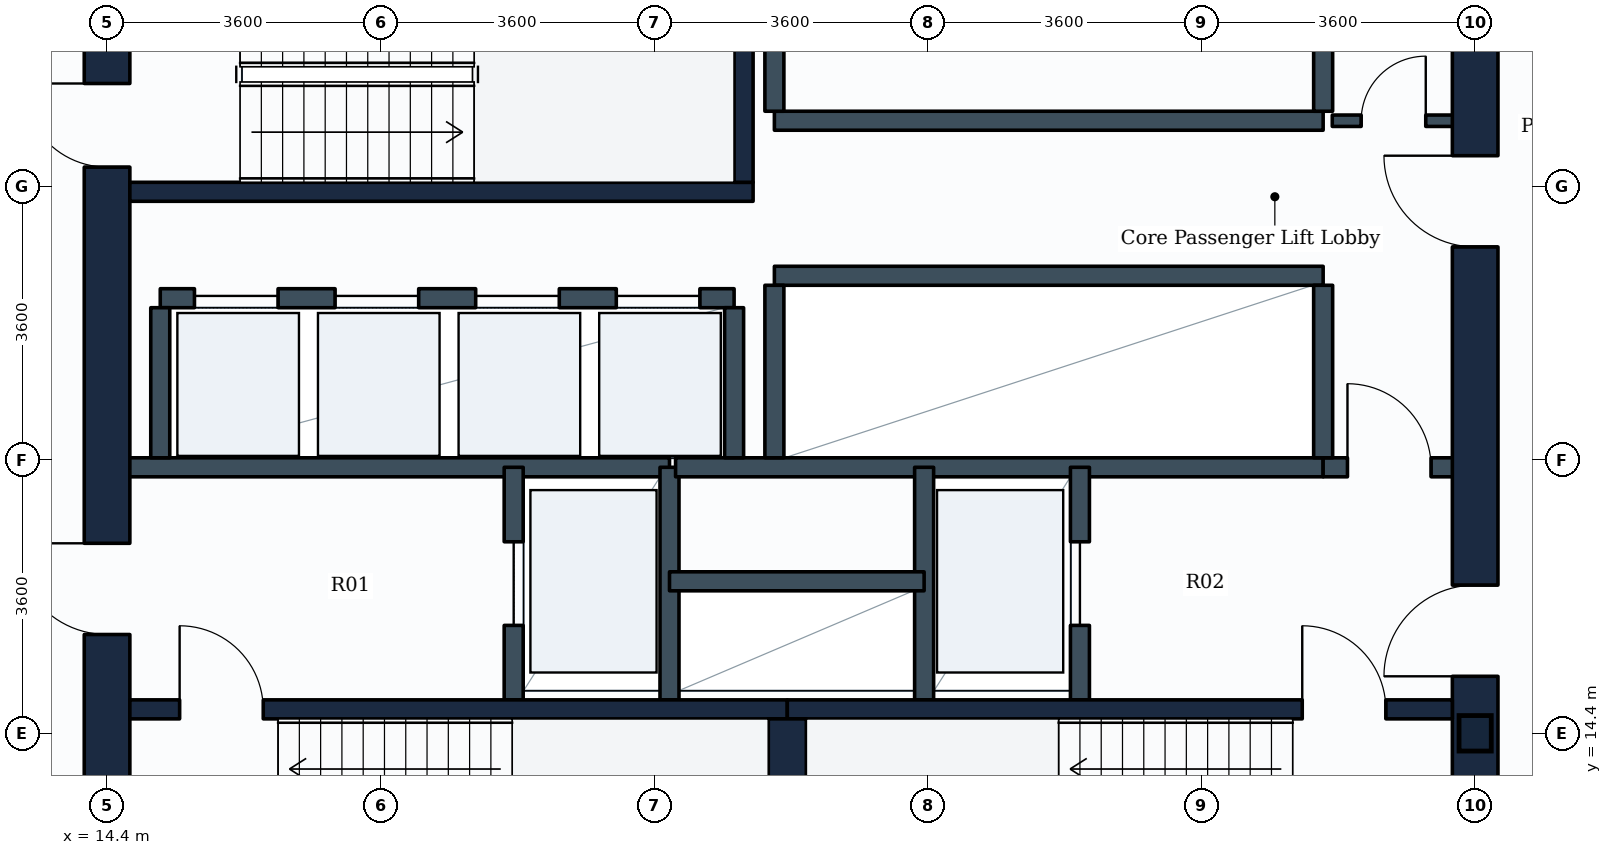
"""IFC4 building model, lengths in metres.
Left out: names, types, materials, properties, quantities, classifications, styles, units other than length and angle.
Written with IfcOpenShell. Run it as: python <this file> out.ifc"""

import sys

from ifc_helpers import new_model, si_unit, direction, frame, frame_2d, origin, origin_2d, place, context, subcontext, project, spatial, rectangle, i_section, extrude, element, fill, save


model = new_model("IFC4")
c1 = context("Model", 3, precision=1e-05, world=origin(), true_north=direction((0.0, 1.0)))
c2 = subcontext(c1, "Body", "Model", "MODEL_VIEW")
j1 = project(units=[si_unit("LENGTHUNIT", "METRE"), si_unit("PLANEANGLEUNIT", "RADIAN")], contexts=[c1])
p1 = place(None, origin())
s1 = spatial("IfcSite", under=j1, at=p1, CompositionType="ELEMENT")
p2 = place(p1, origin())
s2 = spatial("IfcBuilding", under=s1, at=p2, CompositionType="ELEMENT")
p3 = place(p2, frame((0.0, 0.0, 103.5)))
s3 = spatial("IfcBuildingStorey", under=s2, at=p3, CompositionType="ELEMENT", Elevation=103.5)
p4 = place(p3, frame((32.4, 14.4, 0.0), z_axis=(0.0, 0.0, 1.0), x_axis=(1.0, 0.0, 0.0)))
e1 = element("IfcColumn", 1, at=p4, inside=s3, PredefinedType="COLUMN", context=c2, shape_type="SweptSolid", body=[
    extrude(i_section(OverallWidth=0.424, OverallDepth=0.467, WebThickness=0.033, FlangeThickness=0.053, FilletRadius=0.015, at=origin_2d()), origin(), (0.0, 0.0, 1.0), 3.9),
])
p5 = place(p3, frame((14.4, 10.8, 0.0), z_axis=(0.0, 0.0, 1.0), x_axis=(0.0, 1.0, 0.0)))
e2 = element("IfcWall", 2, at=p5, inside=s3, PredefinedType="SHEAR", context=c2, shape_type="SweptSolid", body=[
    extrude(rectangle(XDim=14.4, YDim=0.6, at=frame_2d((7.2, 0.0))), origin(), (0.0, 0.0, 1.0), 3.65),
])
p6 = place(p5, frame((11.05, 0.0, 0.0)))
e3 = element("IfcOpeningElement", 3, at=p6, cuts=e2, PredefinedType="OPENING", context=c2, shape_type="SweptSolid", body=[
    extrude(rectangle(XDim=1.1, YDim=2.1, at=frame_2d((0.55, 1.05))), frame((0.0, 0.31, 0.0), z_axis=(0.0, -1.0, 0.0), x_axis=(1.0, 0.0, 0.0)), (0.0, 0.0, 1.0), 0.62),
])
p7 = place(p5, frame((4.9, 0.0, 0.0)))
e4 = element("IfcOpeningElement", 4, at=p7, cuts=e2, PredefinedType="OPENING", context=c2, shape_type="SweptSolid", body=[
    extrude(rectangle(XDim=1.2, YDim=2.1, at=frame_2d((0.6, 1.05))), frame((0.0, 0.31, 0.0), z_axis=(0.0, -1.0, 0.0), x_axis=(1.0, 0.0, 0.0)), (0.0, 0.0, 1.0), 0.62),
])
p8 = place(p3, frame((32.4, 10.8, 0.0), z_axis=(0.0, 0.0, 1.0), x_axis=(0.0, 1.0, 0.0)))
e5 = element("IfcWall", 5, at=p8, inside=s3, PredefinedType="SHEAR", context=c2, shape_type="SweptSolid", body=[
    extrude(rectangle(XDim=14.4, YDim=0.6, at=frame_2d((7.2, 0.0))), origin(), (0.0, 0.0, 1.0), 3.65),
])
p9 = place(p8, frame((4.35, 0.0, 0.0)))
e6 = element("IfcOpeningElement", 6, at=p9, cuts=e5, PredefinedType="OPENING", context=c2, shape_type="SweptSolid", body=[
    extrude(rectangle(XDim=1.2, YDim=2.1, at=frame_2d((0.6, 1.05))), frame((0.0, 0.31, 0.0), z_axis=(0.0, -1.0, 0.0), x_axis=(1.0, 0.0, 0.0)), (0.0, 0.0, 1.0), 0.62),
])
p10 = place(p8, frame((10.0, 0.0, 0.0)))
e7 = element("IfcOpeningElement", 7, at=p10, cuts=e5, PredefinedType="OPENING", context=c2, shape_type="SweptSolid", body=[
    extrude(rectangle(XDim=1.2, YDim=2.1, at=frame_2d((0.6, 1.05))), frame((0.0, 0.31, 0.0), z_axis=(0.0, -1.0, 0.0), x_axis=(1.0, 0.0, 0.0)), (0.0, 0.0, 1.0), 0.62),
])
p11 = place(p3, frame((14.7, 14.715, 0.0), z_axis=(0.0, 0.0, 1.0), x_axis=(1.0, 0.0, 0.0)))
e8 = element("IfcWall", 8, at=p11, inside=s3, PredefinedType="SHEAR", context=c2, shape_type="SweptSolid", body=[
    extrude(rectangle(XDim=8.65, YDim=0.25, at=frame_2d((4.325, 0.0))), origin(), (0.0, 0.0, 1.0), 3.65),
])
p12 = place(p11, frame((0.655, 0.0, 0.0)))
e9 = element("IfcOpeningElement", 9, at=p12, cuts=e8, PredefinedType="OPENING", context=c2, shape_type="SweptSolid", body=[
    extrude(rectangle(XDim=1.1, YDim=2.1, at=frame_2d((0.55, 1.05))), frame((0.0, 0.135, 0.0), z_axis=(0.0, -1.0, 0.0), x_axis=(1.0, 0.0, 0.0)), (0.0, 0.0, 1.0), 0.27),
])
p13 = place(p3, frame((23.35, 14.715, 0.0), z_axis=(0.0, 0.0, 1.0), x_axis=(1.0, 0.0, 0.0)))
e10 = element("IfcWall", 10, at=p13, inside=s3, PredefinedType="SHEAR", context=c2, shape_type="SweptSolid", body=[
    extrude(rectangle(XDim=8.75, YDim=0.25, at=frame_2d((4.375, 0.0))), origin(), (0.0, 0.0, 1.0), 3.65),
])
p14 = place(p13, frame((6.775, 0.0, 0.0)))
e11 = element("IfcOpeningElement", 11, at=p14, cuts=e10, PredefinedType="OPENING", context=c2, shape_type="SweptSolid", body=[
    extrude(rectangle(XDim=1.1, YDim=2.1, at=frame_2d((0.55, 1.05))), frame((0.0, 0.135, 0.0), z_axis=(0.0, -1.0, 0.0), x_axis=(1.0, 0.0, 0.0)), (0.0, 0.0, 1.0), 0.27),
])
p15 = place(p3, frame((23.35, 11.75, 0.0), z_axis=(0.0, 0.0, 1.0), x_axis=(0.0, 1.0, 0.0)))
e12 = element("IfcWall", 12, at=p15, inside=s3, PredefinedType="SHEAR", context=c2, shape_type="SweptSolid", body=[
    extrude(rectangle(XDim=2.84, YDim=0.5, at=frame_2d((1.42, 0.0))), origin(), (0.0, 0.0, 1.0), 3.65),
])
p16 = place(p3, frame((14.7, 21.525, 0.0), z_axis=(0.0, 0.0, 1.0), x_axis=(1.0, 0.0, 0.0)))
e13 = element("IfcWall", 13, at=p16, inside=s3, PredefinedType="SHEAR", context=c2, shape_type="SweptSolid", body=[
    extrude(rectangle(XDim=8.2, YDim=0.25, at=frame_2d((4.1, 0.0))), origin(), (0.0, 0.0, 1.0), 3.65),
])
p17 = place(p3, frame((22.775, 21.65, 0.0), z_axis=(0.0, 0.0, 1.0), x_axis=(0.0, 1.0, 0.0)))
e14 = element("IfcWall", 14, at=p17, inside=s3, PredefinedType="SHEAR", context=c2, shape_type="SweptSolid", body=[
    extrude(rectangle(XDim=2.84, YDim=0.25, at=frame_2d((1.42, 0.0))), origin(), (0.0, 0.0, 1.0), 3.65),
])
p18 = place(p3, frame((14.65, 17.9, 0.0), z_axis=(0.0, 0.0, 1.0), x_axis=(1.0, 0.0, 0.0)))
e15 = element("IfcWall", 15, at=p18, inside=s3, PredefinedType="PARTITIONING", context=c2, shape_type="SweptSolid", body=[
    extrude(rectangle(XDim=7.15, YDim=0.25, at=frame_2d((3.575, 0.0))), origin(), (0.0, 0.0, 1.0), 3.635),
])
p19 = place(p3, frame((19.75, 14.84, 0.0), z_axis=(0.0, 0.0, 1.0), x_axis=(0.0, 1.0, 0.0)))
e16 = element("IfcWall", 16, at=p19, inside=s3, PredefinedType="PARTITIONING", context=c2, shape_type="SweptSolid", body=[
    extrude(rectangle(XDim=3.06, YDim=0.25, at=frame_2d((1.53, 0.0))), origin(), (0.0, 0.0, 1.0), 3.635),
])
p20 = place(p19, frame((0.98, 0.0, 0.0)))
e17 = element("IfcOpeningElement", 17, at=p20, cuts=e16, PredefinedType="OPENING", context=c2, shape_type="SweptSolid", body=[
    extrude(rectangle(XDim=1.1, YDim=2.1, at=frame_2d((0.55, 1.05))), frame((0.0, 0.135, 0.0), z_axis=(0.0, -1.0, 0.0), x_axis=(1.0, 0.0, 0.0)), (0.0, 0.0, 1.0), 0.27),
])
p21 = place(p3, frame((21.8, 14.84, 0.0), z_axis=(0.0, 0.0, 1.0), x_axis=(0.0, 1.0, 0.0)))
e18 = element("IfcWall", 18, at=p21, inside=s3, PredefinedType="PARTITIONING", context=c2, shape_type="SweptSolid", body=[
    extrude(rectangle(XDim=3.06, YDim=0.25, at=frame_2d((1.53, 0.0))), origin(), (0.0, 0.0, 1.0), 3.635),
])
p22 = place(p3, frame((21.88, 17.9, 0.0), z_axis=(0.0, 0.0, 1.0), x_axis=(1.0, 0.0, 0.0)))
e19 = element("IfcWall", 19, at=p22, inside=s3, PredefinedType="PARTITIONING", context=c2, shape_type="SweptSolid", body=[
    extrude(rectangle(XDim=8.52, YDim=0.25, at=frame_2d((4.26, 0.0))), origin(), (0.0, 0.0, 1.0), 3.635),
])
p23 = place(p3, frame((30.4, 17.9, 0.0), z_axis=(0.0, 0.0, 1.0), x_axis=(1.0, 0.0, 0.0)))
e20 = element("IfcWall", 20, at=p23, inside=s3, PredefinedType="PARTITIONING", context=c2, shape_type="SweptSolid", body=[
    extrude(rectangle(XDim=1.75, YDim=0.25, at=frame_2d((0.875, 0.0))), origin(), (0.0, 0.0, 1.0), 3.635),
])
p24 = place(p23, frame((0.32, 0.0, 0.0)))
e21 = element("IfcOpeningElement", 21, at=p24, cuts=e20, PredefinedType="OPENING", context=c2, shape_type="SweptSolid", body=[
    extrude(rectangle(XDim=1.1, YDim=2.1, at=frame_2d((0.55, 1.05))), frame((0.0, 0.135, 0.0), z_axis=(0.0, -1.0, 0.0), x_axis=(1.0, 0.0, 0.0)), (0.0, 0.0, 1.0), 0.27),
])
p25 = place(p3, frame((25.15, 14.84, 0.0), z_axis=(0.0, 0.0, 1.0), x_axis=(0.0, 1.0, 0.0)))
e22 = element("IfcWall", 22, at=p25, inside=s3, PredefinedType="PARTITIONING", context=c2, shape_type="SweptSolid", body=[
    extrude(rectangle(XDim=3.06, YDim=0.25, at=frame_2d((1.53, 0.0))), origin(), (0.0, 0.0, 1.0), 3.635),
])
p26 = place(p3, frame((27.2, 14.84, 0.0), z_axis=(0.0, 0.0, 1.0), x_axis=(0.0, 1.0, 0.0)))
e23 = element("IfcWall", 23, at=p26, inside=s3, PredefinedType="PARTITIONING", context=c2, shape_type="SweptSolid", body=[
    extrude(rectangle(XDim=3.06, YDim=0.25, at=frame_2d((1.53, 0.0))), origin(), (0.0, 0.0, 1.0), 3.635),
])
p27 = place(p26, frame((0.98, 0.0, 0.0)))
e24 = element("IfcOpeningElement", 24, at=p27, cuts=e23, PredefinedType="OPENING", context=c2, shape_type="SweptSolid", body=[
    extrude(rectangle(XDim=1.1, YDim=2.1, at=frame_2d((0.55, 1.05))), frame((0.0, 0.135, 0.0), z_axis=(0.0, -1.0, 0.0), x_axis=(1.0, 0.0, 0.0)), (0.0, 0.0, 1.0), 0.27),
])
p28 = place(p3, frame((21.8, 16.4, 0.0), z_axis=(0.0, 0.0, 1.0), x_axis=(1.0, 0.0, 0.0)))
e25 = element("IfcWall", 25, at=p28, inside=s3, PredefinedType="PARTITIONING", context=c2, shape_type="SweptSolid", body=[
    extrude(rectangle(XDim=3.35, YDim=0.25, at=frame_2d((1.675, 0.0))), origin(), (0.0, 0.0, 1.0), 3.635),
])
p29 = place(p3, frame((15.1, 20.125, 0.0), z_axis=(0.0, 0.0, 1.0), x_axis=(1.0, 0.0, 0.0)))
e26 = element("IfcWall", 26, at=p29, inside=s3, PredefinedType="PARTITIONING", context=c2, shape_type="SweptSolid", body=[
    extrude(rectangle(XDim=7.55, YDim=0.25, at=frame_2d((3.775, 0.0))), origin(), (0.0, 0.0, 1.0), 3.635),
])
p30 = place(p29, frame((0.45, 0.0, 0.0)))
e27 = element("IfcOpeningElement", 27, at=p30, cuts=e26, PredefinedType="OPENING", context=c2, shape_type="SweptSolid", body=[
    extrude(rectangle(XDim=1.1, YDim=2.1, at=frame_2d((0.55, 1.05))), frame((0.0, 0.135, 0.0), z_axis=(0.0, -1.0, 0.0), x_axis=(1.0, 0.0, 0.0)), (0.0, 0.0, 1.0), 0.27),
])
p31 = place(p29, frame((2.3, 0.0, 0.0)))
e28 = element("IfcOpeningElement", 28, at=p31, cuts=e26, PredefinedType="OPENING", context=c2, shape_type="SweptSolid", body=[
    extrude(rectangle(XDim=1.1, YDim=2.1, at=frame_2d((0.55, 1.05))), frame((0.0, 0.135, 0.0), z_axis=(0.0, -1.0, 0.0), x_axis=(1.0, 0.0, 0.0)), (0.0, 0.0, 1.0), 0.27),
])
p32 = place(p29, frame((4.15, 0.0, 0.0)))
e29 = element("IfcOpeningElement", 29, at=p32, cuts=e26, PredefinedType="OPENING", context=c2, shape_type="SweptSolid", body=[
    extrude(rectangle(XDim=1.1, YDim=2.1, at=frame_2d((0.55, 1.05))), frame((0.0, 0.135, 0.0), z_axis=(0.0, -1.0, 0.0), x_axis=(1.0, 0.0, 0.0)), (0.0, 0.0, 1.0), 0.27),
])
p33 = place(p29, frame((6.0, 0.0, 0.0)))
e30 = element("IfcOpeningElement", 30, at=p33, cuts=e26, PredefinedType="OPENING", context=c2, shape_type="SweptSolid", body=[
    extrude(rectangle(XDim=1.1, YDim=2.1, at=frame_2d((0.55, 1.05))), frame((0.0, 0.135, 0.0), z_axis=(0.0, -1.0, 0.0), x_axis=(1.0, 0.0, 0.0)), (0.0, 0.0, 1.0), 0.27),
])
for number, where, z_axis, x_axis in (
    (31, (15.1, 18.025, 0.0), (0.0, 0.0, 1.0), (0.0, 1.0, 0.0)),
    (32, (22.65, 18.025, 0.0), (0.0, 0.0, 1.0), (0.0, 1.0, 0.0)),
):
    element("IfcWall", number, at=place(p3, frame(where, z_axis=z_axis, x_axis=x_axis)), inside=s3, PredefinedType="PARTITIONING", context=c2, shape_type="SweptSolid", body=[
        extrude(rectangle(XDim=1.975, YDim=0.25, at=frame_2d((0.988, 0.0))), origin(), (0.0, 0.0, 1.0), 3.635),
    ])
p34 = place(p3, frame((23.18, 20.42, 0.0), z_axis=(0.0, 0.0, 1.0), x_axis=(1.0, 0.0, 0.0)))
e33 = element("IfcWall", 33, at=p34, inside=s3, PredefinedType="PARTITIONING", context=c2, shape_type="SweptSolid", body=[
    extrude(rectangle(XDim=7.22, YDim=0.25, at=frame_2d((3.61, 0.0))), origin(), (0.0, 0.0, 1.0), 3.635),
])
for number, where, z_axis, x_axis in (
    (34, (23.18, 18.025, 0.0), (0.0, 0.0, 1.0), (0.0, 1.0, 0.0)),
    (35, (30.4, 18.025, 0.0), (0.0, 0.0, 1.0), (0.0, 1.0, 0.0)),
):
    element("IfcWall", number, at=place(p3, frame(where, z_axis=z_axis, x_axis=x_axis)), inside=s3, PredefinedType="PARTITIONING", context=c2, shape_type="SweptSolid", body=[
        extrude(rectangle(XDim=2.27, YDim=0.25, at=frame_2d((1.135, 0.0))), origin(), (0.0, 0.0, 1.0), 3.635),
    ])
p35 = place(p3, frame((23.18, 22.46, 0.0), z_axis=(0.0, 0.0, 1.0), x_axis=(1.0, 0.0, 0.0)))
e36 = element("IfcWall", 36, at=p35, inside=s3, PredefinedType="PARTITIONING", context=c2, shape_type="SweptSolid", body=[
    extrude(rectangle(XDim=7.22, YDim=0.25, at=frame_2d((3.61, 0.0))), origin(), (0.0, 0.0, 1.0), 3.635),
])
for number, where, z_axis, x_axis in (
    (37, (23.18, 22.585, 0.0), (0.0, 0.0, 1.0), (0.0, 1.0, 0.0)),
    (38, (30.4, 22.585, 0.0), (0.0, 0.0, 1.0), (0.0, 1.0, 0.0)),
):
    element("IfcWall", number, at=place(p3, frame(where, z_axis=z_axis, x_axis=x_axis)), inside=s3, PredefinedType="PARTITIONING", context=c2, shape_type="SweptSolid", body=[
        extrude(rectangle(XDim=2.315, YDim=0.25, at=frame_2d((1.157, 0.0))), origin(), (0.0, 0.0, 1.0), 3.635),
    ])
p36 = place(p3, frame((30.52, 22.46, 0.0), z_axis=(0.0, 0.0, 1.0), x_axis=(1.0, 0.0, 0.0)))
e39 = element("IfcWall", 39, at=p36, inside=s3, PredefinedType="PARTITIONING", context=c2, shape_type="SweptSolid", body=[
    extrude(rectangle(XDim=1.63, YDim=0.15, at=frame_2d((0.815, 0.0))), origin(), (0.0, 0.0, 1.0), 3.635),
])
p37 = place(p36, frame((0.38, 0.0, 0.0)))
e40 = element("IfcOpeningElement", 40, at=p37, cuts=e39, PredefinedType="OPENING", context=c2, shape_type="SweptSolid", body=[
    extrude(rectangle(XDim=0.85, YDim=2.1, at=frame_2d((0.425, 1.05))), frame((0.0, 0.085, 0.0), z_axis=(0.0, -1.0, 0.0), x_axis=(1.0, 0.0, 0.0)), (0.0, 0.0, 1.0), 0.17),
])
p38 = place(p12, origin())
e41 = element("IfcDoor", 41, at=p38, inside=s3, OperationType="SINGLE_SWING_LEFT", PredefinedType="DOOR", context=c2, shape_type="SweptSolid", body=[
    extrude(rectangle(XDim=1.1, YDim=2.1, at=frame_2d((0.55, 1.05))), frame((0.0, 0.025, 0.0), z_axis=(0.0, -1.0, 0.0), x_axis=(1.0, 0.0, 0.0)), (0.0, 0.0, 1.0), 0.05),
])
fill(e9, e41)
p39 = place(p14, origin())
e42 = element("IfcDoor", 42, at=p39, inside=s3, OperationType="SINGLE_SWING_LEFT", PredefinedType="DOOR", context=c2, shape_type="SweptSolid", body=[
    extrude(rectangle(XDim=1.1, YDim=2.1, at=frame_2d((0.55, 1.05))), frame((0.0, 0.025, 0.0), z_axis=(0.0, -1.0, 0.0), x_axis=(1.0, 0.0, 0.0)), (0.0, 0.0, 1.0), 0.05),
])
fill(e11, e42)
p40 = place(p6, origin())
e43 = element("IfcDoor", 43, at=p40, inside=s3, OperationType="SINGLE_SWING_RIGHT", PredefinedType="DOOR", context=c2, shape_type="SweptSolid", body=[
    extrude(rectangle(XDim=1.1, YDim=2.1, at=frame_2d((0.55, 1.05))), frame((0.0, 0.025, 0.0), z_axis=(0.0, -1.0, 0.0), x_axis=(1.0, 0.0, 0.0)), (0.0, 0.0, 1.0), 0.05),
])
fill(e3, e43)
p41 = place(p20, origin())
e44 = element("IfcDoor", 44, at=p41, inside=s3, OperationType="SLIDING_TO_LEFT", PredefinedType="DOOR", context=c2, shape_type="SweptSolid", body=[
    extrude(rectangle(XDim=1.1, YDim=2.1, at=frame_2d((0.55, 1.05))), frame((0.0, 0.025, 0.0), z_axis=(0.0, -1.0, 0.0), x_axis=(1.0, 0.0, 0.0)), (0.0, 0.0, 1.0), 0.05),
])
fill(e17, e44)
p42 = place(p27, origin())
e45 = element("IfcDoor", 45, at=p42, inside=s3, OperationType="SLIDING_TO_LEFT", PredefinedType="DOOR", context=c2, shape_type="SweptSolid", body=[
    extrude(rectangle(XDim=1.1, YDim=2.1, at=frame_2d((0.55, 1.05))), frame((0.0, 0.025, 0.0), z_axis=(0.0, -1.0, 0.0), x_axis=(1.0, 0.0, 0.0)), (0.0, 0.0, 1.0), 0.05),
])
fill(e24, e45)
p43 = place(p7, origin())
e46 = element("IfcDoor", 46, at=p43, inside=s3, OperationType="SINGLE_SWING_RIGHT", PredefinedType="DOOR", context=c2, shape_type="SweptSolid", body=[
    extrude(rectangle(XDim=1.2, YDim=2.1, at=frame_2d((0.6, 1.05))), frame((0.0, 0.025, 0.0), z_axis=(0.0, -1.0, 0.0), x_axis=(1.0, 0.0, 0.0)), (0.0, 0.0, 1.0), 0.05),
])
fill(e4, e46)
p44 = place(p9, origin())
e47 = element("IfcDoor", 47, at=p44, inside=s3, OperationType="SINGLE_SWING_LEFT", PredefinedType="DOOR", context=c2, shape_type="SweptSolid", body=[
    extrude(rectangle(XDim=1.2, YDim=2.1, at=frame_2d((0.6, 1.05))), frame((0.0, 0.025, 0.0), z_axis=(0.0, -1.0, 0.0), x_axis=(1.0, 0.0, 0.0)), (0.0, 0.0, 1.0), 0.05),
])
fill(e6, e47)
p45 = place(p24, origin())
e48 = element("IfcDoor", 48, at=p45, inside=s3, OperationType="SINGLE_SWING_LEFT", PredefinedType="DOOR", context=c2, shape_type="SweptSolid", body=[
    extrude(rectangle(XDim=1.1, YDim=2.1, at=frame_2d((0.55, 1.05))), frame((0.0, 0.025, 0.0), z_axis=(0.0, -1.0, 0.0), x_axis=(1.0, 0.0, 0.0)), (0.0, 0.0, 1.0), 0.05),
])
fill(e21, e48)
p46 = place(p30, origin())
e49 = element("IfcDoor", 49, at=p46, inside=s3, OperationType="SLIDING_TO_LEFT", PredefinedType="DOOR", context=c2, shape_type="SweptSolid", body=[
    extrude(rectangle(XDim=1.1, YDim=2.1, at=frame_2d((0.55, 1.05))), frame((0.0, 0.025, 0.0), z_axis=(0.0, -1.0, 0.0), x_axis=(1.0, 0.0, 0.0)), (0.0, 0.0, 1.0), 0.05),
])
fill(e27, e49)
p47 = place(p31, origin())
e50 = element("IfcDoor", 50, at=p47, inside=s3, OperationType="SLIDING_TO_LEFT", PredefinedType="DOOR", context=c2, shape_type="SweptSolid", body=[
    extrude(rectangle(XDim=1.1, YDim=2.1, at=frame_2d((0.55, 1.05))), frame((0.0, 0.025, 0.0), z_axis=(0.0, -1.0, 0.0), x_axis=(1.0, 0.0, 0.0)), (0.0, 0.0, 1.0), 0.05),
])
fill(e28, e50)
p48 = place(p32, origin())
e51 = element("IfcDoor", 51, at=p48, inside=s3, OperationType="SLIDING_TO_LEFT", PredefinedType="DOOR", context=c2, shape_type="SweptSolid", body=[
    extrude(rectangle(XDim=1.1, YDim=2.1, at=frame_2d((0.55, 1.05))), frame((0.0, 0.025, 0.0), z_axis=(0.0, -1.0, 0.0), x_axis=(1.0, 0.0, 0.0)), (0.0, 0.0, 1.0), 0.05),
])
fill(e29, e51)
p49 = place(p33, origin())
e52 = element("IfcDoor", 52, at=p49, inside=s3, OperationType="SLIDING_TO_LEFT", PredefinedType="DOOR", context=c2, shape_type="SweptSolid", body=[
    extrude(rectangle(XDim=1.1, YDim=2.1, at=frame_2d((0.55, 1.05))), frame((0.0, 0.025, 0.0), z_axis=(0.0, -1.0, 0.0), x_axis=(1.0, 0.0, 0.0)), (0.0, 0.0, 1.0), 0.05),
])
fill(e30, e52)
p50 = place(p10, origin())
e53 = element("IfcDoor", 53, at=p50, inside=s3, OperationType="SINGLE_SWING_RIGHT", PredefinedType="DOOR", context=c2, shape_type="SweptSolid", body=[
    extrude(rectangle(XDim=1.2, YDim=2.1, at=frame_2d((0.6, 1.05))), frame((0.0, 0.025, 0.0), z_axis=(0.0, -1.0, 0.0), x_axis=(1.0, 0.0, 0.0)), (0.0, 0.0, 1.0), 0.05),
])
fill(e7, e53)
p51 = place(p37, origin())
e54 = element("IfcDoor", 54, at=p51, inside=s3, OperationType="SINGLE_SWING_RIGHT", PredefinedType="DOOR", context=c2, shape_type="SweptSolid", body=[
    extrude(rectangle(XDim=0.85, YDim=2.1, at=frame_2d((0.425, 1.05))), frame((0.0, 0.025, 0.0), z_axis=(0.0, -1.0, 0.0), x_axis=(1.0, 0.0, 0.0)), (0.0, 0.0, 1.0), 0.05),
])
fill(e40, e54)
save(model, sys.argv[1])
